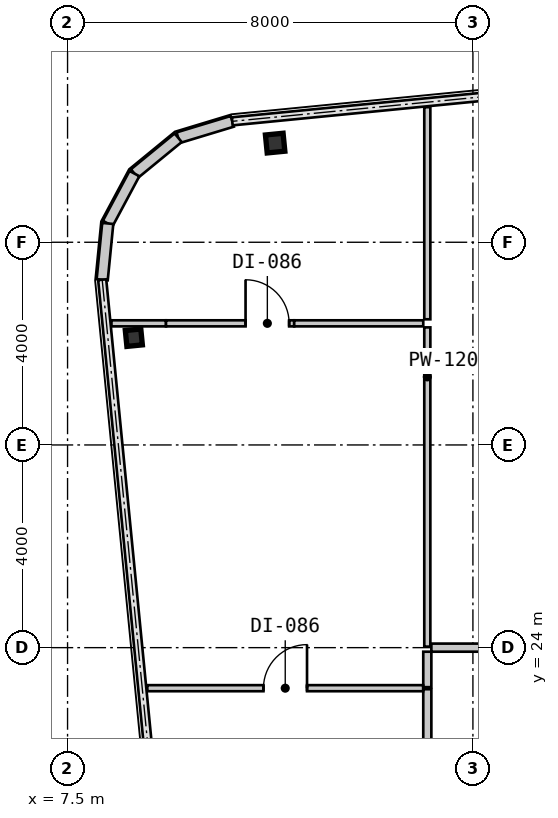
"""IFC4 building model, lengths in metres.
Left out: names, types, materials, properties, quantities, classifications, styles, units other than length and angle.
Written with IfcOpenShell. Run it as: python <this file> out.ifc"""

import sys

from ifc_helpers import new_model, si_unit, direction, frame, frame_2d, origin, origin_2d, place, context, subcontext, project, spatial, rectangle, i_section, extrude, source, transform, mapped, element, fill, save


model = new_model("IFC4")
c1 = context("Model", 3, precision=1e-05, world=origin(), true_north=direction((0.0, 1.0)))
c2 = subcontext(c1, "Body", "Model", "MODEL_VIEW")
j1 = project(units=[si_unit("LENGTHUNIT", "METRE"), si_unit("PLANEANGLEUNIT", "RADIAN")], contexts=[c1])
p1 = place(None, origin())
s1 = spatial("IfcSite", under=j1, at=p1, CompositionType="ELEMENT")
p2 = place(p1, origin())
s2 = spatial("IfcBuilding", under=s1, at=p2, CompositionType="ELEMENT")
p3 = place(p2, frame((0.0, 0.0, 106.05)))
s3 = spatial("IfcBuildingStorey", under=s2, at=p3, CompositionType="ELEMENT", Elevation=106.05)
m1 = source(origin(), c2, "Body", "SweptSolid", [
    extrude(i_section(OverallWidth=0.35, OverallDepth=0.356, WebThickness=0.018, FlangeThickness=0.028, at=origin_2d()), origin(), (0.0, 0.0, 1.0), 3.15),
])
p4 = place(p3, frame((11.597, 33.957, 0.0), z_axis=(0.0, 0.0, 1.0), x_axis=(0.995227399982, 0.097582899759, 0.0)))
e1 = element("IfcColumn", 1, at=p4, inside=s3, PredefinedType="COLUMN", context=c2, shape_type="MappedRepresentation", body=[
    mapped(m1, transform((0.0, 0.0, 0.0), scale=1.0)),
])
m2 = source(origin(), c2, "Body", "SweptSolid", [
    extrude(i_section(OverallWidth=0.307, OverallDepth=0.315, WebThickness=0.012, FlangeThickness=0.019, at=origin_2d()), origin(), (0.0, 0.0, 1.0), 3.15),
])
p5 = place(p3, frame((8.808, 30.116, 0.0), z_axis=(0.0, 0.0, 1.0), x_axis=(0.995227399982, 0.097582899759, 0.0)))
e2 = element("IfcColumn", 2, at=p5, inside=s3, PredefinedType="COLUMN", context=c2, shape_type="MappedRepresentation", body=[
    mapped(m2, transform((0.0, 0.0, 0.0), scale=1.0)),
])
m3 = source(origin(), c2, "Body", "SweptSolid", [
    extrude(rectangle(XDim=1.116, YDim=0.22, at=frame_2d((0.558, 0.0))), origin(), (0.0, 0.0, 1.0), 2.93),
])
p6 = place(p3, frame((10.751, 34.386, 0.0), z_axis=(0.0, 0.0, 1.0), x_axis=(-0.957070388811, -0.289855603468, 0.0)))
e3 = element("IfcWall", 3, at=p6, inside=s3, PredefinedType="SOLIDWALL", context=c2, shape_type="MappedRepresentation", body=[
    mapped(m3, transform((0.0, 0.0, 0.0), scale=1.0)),
])
m4 = source(origin(), c2, "Body", "SweptSolid", [
    extrude(rectangle(XDim=1.116, YDim=0.22, at=frame_2d((0.558, 0.0))), origin(), (0.0, 0.0, 1.0), 2.93),
])
p7 = place(p3, frame((9.683, 34.063, 0.0), z_axis=(0.0, 0.0, 1.0), x_axis=(-0.773254916409, -0.634095287989, 0.0)))
e4 = element("IfcWall", 4, at=p7, inside=s3, PredefinedType="SOLIDWALL", context=c2, shape_type="MappedRepresentation", body=[
    mapped(m4, transform((0.0, 0.0, 0.0), scale=1.0)),
])
m5 = source(origin(), c2, "Body", "SweptSolid", [
    extrude(rectangle(XDim=1.116, YDim=0.22, at=frame_2d((0.558, 0.0))), origin(), (0.0, 0.0, 1.0), 2.93),
])
p8 = place(p3, frame((8.82, 33.355, 0.0), z_axis=(0.0, 0.0, 1.0), x_axis=(-0.471802540493, -0.881704237704, 0.0)))
e5 = element("IfcWall", 5, at=p8, inside=s3, PredefinedType="SOLIDWALL", context=c2, shape_type="MappedRepresentation", body=[
    mapped(m5, transform((0.0, 0.0, 0.0), scale=1.0)),
])
p9 = place(p3, frame((8.293, 32.371, 0.0), z_axis=(0.0, 0.0, 1.0), x_axis=(-0.098463783145, -0.99514063499, 0.0)))
e6 = element("IfcWall", 6, at=p9, inside=s3, PredefinedType="SOLIDWALL", context=c2, shape_type="MappedRepresentation", body=[
    mapped(m4, transform((0.0, 0.0, 0.0), scale=1.0)),
])
m6 = source(origin(), c2, "Body", "SweptSolid", [
    extrude(rectangle(XDim=12.401, YDim=0.16, at=frame_2d((6.201, 0.0))), origin(), (0.0, 0.0, 1.0), 2.93),
])
p10 = place(p3, frame((14.6, 10.778, 0.0), z_axis=(0.0, 0.0, 1.0), x_axis=(0.0, 1.0, 0.0)))
e7 = element("IfcWall", 7, at=p10, inside=s3, PredefinedType="PARTITIONING", context=c2, shape_type="MappedRepresentation", body=[
    mapped(m6, transform((0.0, 0.0, 0.0), scale=1.0)),
])
m7 = source(origin(), c2, "Body", "SweptSolid", [
    extrude(rectangle(XDim=0.92, YDim=2.1, at=frame_2d((0.46, 1.05))), frame((0.0, 0.09, 0.0), z_axis=(0.0, -1.0, 0.0), x_axis=(1.0, 0.0, 0.0)), (0.0, 0.0, 1.0), 0.18),
])
p11 = place(p10, frame((4.991, 0.0, 0.0)))
e8 = element("IfcOpeningElement", 8, at=p11, cuts=e7, PredefinedType="OPENING", context=c2, shape_type="MappedRepresentation", body=[
    mapped(m7, transform((0.0, 0.0, 0.0), scale=1.0)),
])
m8 = source(origin(), c2, "Body", "SweptSolid", [
    extrude(rectangle(XDim=0.7, YDim=0.16, at=frame_2d((0.35, 0.0))), origin(), (0.0, 0.0, 1.0), 2.93),
])
p12 = place(p3, frame((14.6, 23.22, 0.0), z_axis=(0.0, 0.0, 1.0), x_axis=(0.0, 1.0, 0.0)))
e9 = element("IfcWall", 9, at=p12, inside=s3, PredefinedType="PARTITIONING", context=c2, shape_type="MappedRepresentation", body=[
    mapped(m8, transform((0.0, 0.0, 0.0), scale=1.0)),
])
m9 = source(origin(), c2, "Body", "SweptSolid", [
    extrude(rectangle(XDim=4.17, YDim=0.16, at=frame_2d((2.085, 0.0))), origin(), (0.0, 0.0, 1.0), 2.93),
])
p13 = place(p3, frame((14.68, 24.0, 0.0), z_axis=(0.0, 0.0, 1.0), x_axis=(1.0, 0.0, 0.0)))
e10 = element("IfcWall", 10, at=p13, inside=s3, PredefinedType="PARTITIONING", context=c2, shape_type="MappedRepresentation", body=[
    mapped(m9, transform((0.0, 0.0, 0.0), scale=1.0)),
])
p14 = place(p13, frame((1.69, 0.0, 0.0)))
e11 = element("IfcOpeningElement", 11, at=p14, cuts=e10, PredefinedType="OPENING", context=c2, shape_type="MappedRepresentation", body=[
    mapped(m7, transform((0.0, 0.0, 0.0), scale=1.0)),
])
m10 = source(origin(), c2, "Body", "SweptSolid", [
    extrude(rectangle(XDim=5.444, YDim=0.12, at=frame_2d((2.722, 0.0))), origin(), (0.0, 0.0, 1.0), 2.93),
])
p15 = place(p3, frame((9.074, 23.2, 0.0), z_axis=(0.0, 0.0, 1.0), x_axis=(1.0, 0.0, 0.0)))
e12 = element("IfcWall", 12, at=p15, inside=s3, PredefinedType="PARTITIONING", context=c2, shape_type="MappedRepresentation", body=[
    mapped(m10, transform((0.0, 0.0, 0.0), scale=1.0)),
])
m11 = source(origin(), c2, "Body", "SweptSolid", [
    extrude(rectangle(XDim=0.86, YDim=2.1, at=frame_2d((0.43, 1.05))), frame((0.0, 0.07, 0.0), z_axis=(0.0, -1.0, 0.0), x_axis=(1.0, 0.0, 0.0)), (0.0, 0.0, 1.0), 0.14),
])
p16 = place(p15, frame((2.292, 0.0, 0.0)))
e13 = element("IfcOpeningElement", 13, at=p16, cuts=e12, PredefinedType="OPENING", context=c2, shape_type="MappedRepresentation", body=[
    mapped(m11, transform((0.0, 0.0, 0.0), scale=1.0)),
])
m12 = source(origin(), c2, "Body", "SweptSolid", [
    extrude(rectangle(XDim=1.077, YDim=0.12, at=frame_2d((0.538, 0.0))), origin(), (0.0, 0.0, 1.0), 2.93),
])
p17 = place(p3, frame((8.366, 30.4, 0.0), z_axis=(0.0, 0.0, 1.0), x_axis=(1.0, 0.0, 0.0)))
e14 = element("IfcWall", 14, at=p17, inside=s3, PredefinedType="PARTITIONING", context=c2, shape_type="MappedRepresentation", body=[
    mapped(m12, transform((0.0, 0.0, 0.0), scale=1.0)),
])
m13 = source(origin(), c2, "Body", "SweptSolid", [
    extrude(rectangle(XDim=2.53, YDim=0.12, at=frame_2d((1.265, 0.0))), origin(), (0.0, 0.0, 1.0), 2.397),
])
p18 = place(p3, frame((9.443, 30.4, 0.0), z_axis=(0.0, 0.0, 1.0), x_axis=(1.0, 0.0, 0.0)))
e15 = element("IfcWall", 15, at=p18, inside=s3, PredefinedType="PARTITIONING", context=c2, shape_type="MappedRepresentation", body=[
    mapped(m13, transform((0.0, 0.0, 0.0), scale=1.0)),
])
p19 = place(p18, frame((1.57, 0.0, 0.0)))
e16 = element("IfcOpeningElement", 16, at=p19, cuts=e15, PredefinedType="OPENING", context=c2, shape_type="MappedRepresentation", body=[
    mapped(m11, transform((0.0, 0.0, 0.0), scale=1.0)),
])
m14 = source(origin(), c2, "Body", "SweptSolid", [
    extrude(rectangle(XDim=2.547, YDim=0.12, at=frame_2d((1.273, 0.0))), origin(), (0.0, 0.0, 1.0), 2.93),
])
p20 = place(p3, frame((11.973, 30.4, 0.0), z_axis=(0.0, 0.0, 1.0), x_axis=(1.0, 0.0, 0.0)))
e17 = element("IfcWall", 17, at=p20, inside=s3, PredefinedType="PARTITIONING", context=c2, shape_type="MappedRepresentation", body=[
    mapped(m14, transform((0.0, 0.0, 0.0), scale=1.0)),
])
m15 = source(origin(), c2, "Body", "SweptSolid", [
    extrude(rectangle(XDim=6.3, YDim=0.12, at=frame_2d((3.15, 0.0))), origin(), (0.0, 0.0, 1.0), 2.93),
])
p21 = place(p3, frame((14.6, 30.32, 0.0), z_axis=(0.0, 0.0, 1.0), x_axis=(0.0, -1.0, 0.0)))
e18 = element("IfcWall", 18, at=p21, inside=s3, PredefinedType="PARTITIONING", context=c2, shape_type="MappedRepresentation", body=[
    mapped(m15, transform((0.0, 0.0, 0.0), scale=1.0)),
])
m16 = source(origin(), c2, "Body", "SweptSolid", [
    extrude(rectangle(XDim=4.186, YDim=0.12, at=frame_2d((2.093, 0.0))), origin(), (0.0, 0.0, 1.0), 2.93),
])
p22 = place(p3, frame((14.6, 34.666, 0.0), z_axis=(0.0, 0.0, 1.0), x_axis=(0.0, -1.0, 0.0)))
e19 = element("IfcWall", 19, at=p22, inside=s3, PredefinedType="PARTITIONING", context=c2, shape_type="MappedRepresentation", body=[
    mapped(m16, transform((0.0, 0.0, 0.0), scale=1.0)),
])
m17 = source(origin(), c2, "Body", "SweptSolid", [
    extrude(rectangle(XDim=0.86, YDim=2.1, at=frame_2d((0.43, 1.05))), frame((0.0, 0.025, 0.0), z_axis=(0.0, -1.0, 0.0), x_axis=(1.0, 0.0, 0.0)), (0.0, 0.0, 1.0), 0.05),
])
p23 = place(p16, origin())
e20 = element("IfcDoor", 20, at=p23, inside=s3, OperationType="SINGLE_SWING_RIGHT", PredefinedType="DOOR", context=c2, shape_type="MappedRepresentation", body=[
    mapped(m17, transform((0.0, 0.0, 0.0), scale=1.0)),
])
fill(e13, e20)
p24 = place(p19, origin())
e21 = element("IfcDoor", 21, at=p24, inside=s3, OperationType="SINGLE_SWING_LEFT", PredefinedType="DOOR", context=c2, shape_type="MappedRepresentation", body=[
    mapped(m17, transform((0.0, 0.0, 0.0), scale=1.0)),
])
fill(e16, e21)
save(model, sys.argv[1])
